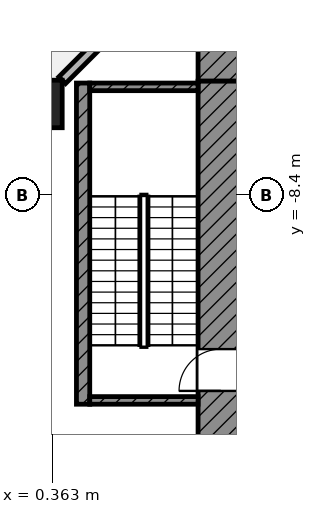
"""IFC4 building model, lengths in metres.
Left out: names, types, materials, properties, quantities, classifications, styles, units other than length and angle.
Written with IfcOpenShell. Run it as: python <this file> out.ifc"""

import sys

from ifc_helpers import new_model, si_unit, direction, frame, frame_2d, origin, origin_2d, place, context, subcontext, project, spatial, rectangle, extrude, element, fill, save


model = new_model("IFC4")
c1 = context("Model", 3, precision=1e-05, world=origin(), true_north=direction((0.0, 1.0)))
c2 = subcontext(c1, "Body", "Model", "MODEL_VIEW")
j1 = project(units=[si_unit("LENGTHUNIT", "METRE"), si_unit("PLANEANGLEUNIT", "RADIAN")], contexts=[c1])
p1 = place(None, origin())
s1 = spatial("IfcSite", under=j1, at=p1, CompositionType="ELEMENT")
p2 = place(p1, origin())
s2 = spatial("IfcBuilding", under=s1, at=p2, CompositionType="ELEMENT")
p3 = place(p2, frame((0.0, 0.0, 34.2)))
s3 = spatial("IfcBuildingStorey", under=s2, at=p3, CompositionType="ELEMENT", Elevation=34.2)
p4 = place(p3, frame((0.0, -6.0, 0.0), z_axis=(0.0, 0.0, 1.0), x_axis=(1.0, 0.0, 0.0)))
e1 = element("IfcColumn", 1, at=p4, inside=s3, PredefinedType="COLUMN", context=c2, shape_type="SweptSolid", body=[
    extrude(rectangle(XDim=1.25, YDim=1.25, at=origin_2d()), origin(), (0.0, 0.0, 1.0), 5.0),
])
p5 = place(p3, frame((5.375, -0.625, 0.0), z_axis=(0.0, 0.0, 1.0), x_axis=(-0.707106781187, -0.707106781187, 0.0)))
e2 = element("IfcWall", 2, at=p5, inside=s3, PredefinedType="SOLIDWALL", context=c2, shape_type="SweptSolid", body=[
    extrude(rectangle(XDim=6.718, YDim=0.25, at=frame_2d((3.359, 0.0))), origin(), (0.0, 0.0, 1.0), 3.08),
])
p6 = place(p3, frame((4.2, -4.8, 0.0), z_axis=(0.0, 0.0, 1.0), x_axis=(1.0, 0.0, 0.0)))
e3 = element("IfcWall", 3, at=p6, inside=s3, PredefinedType="SHEAR", context=c2, shape_type="SweptSolid", body=[
    extrude(rectangle(XDim=20.9, YDim=1.2, at=frame_2d((10.45, 0.0))), origin(), (0.0, 0.0, 1.0), 4.58),
])
p7 = place(p6, frame((1.95, 0.0, 0.0)))
e4 = element("IfcOpeningElement", 4, at=p7, cuts=e3, PredefinedType="OPENING", context=c2, shape_type="SweptSolid", body=[
    extrude(rectangle(XDim=1.1, YDim=2.1, at=frame_2d((0.55, 1.05))), frame((0.0, 0.61, 0.0), z_axis=(0.0, -1.0, 0.0), x_axis=(1.0, 0.0, 0.0)), (0.0, 0.0, 1.0), 1.22),
])
p8 = place(p6, frame((17.95, 0.0, 0.0)))
e5 = element("IfcOpeningElement", 5, at=p8, cuts=e3, PredefinedType="OPENING", context=c2, shape_type="SweptSolid", body=[
    extrude(rectangle(XDim=1.1, YDim=2.1, at=frame_2d((0.55, 1.05))), frame((0.0, 0.61, 0.0), z_axis=(0.0, -1.0, 0.0), x_axis=(1.0, 0.0, 0.0)), (0.0, 0.0, 1.0), 1.22),
])
p9 = place(p3, frame((4.8, -25.1, 0.0), z_axis=(0.0, 0.0, 1.0), x_axis=(0.0, 1.0, 0.0)))
e6 = element("IfcWall", 6, at=p9, inside=s3, PredefinedType="SHEAR", context=c2, shape_type="SweptSolid", body=[
    extrude(rectangle(XDim=19.7, YDim=1.2, at=frame_2d((9.85, 0.0))), origin(), (0.0, 0.0, 1.0), 4.58),
])
p10 = place(p9, frame((11.55, 0.0, 0.0)))
e7 = element("IfcOpeningElement", 7, at=p10, cuts=e6, PredefinedType="OPENING", context=c2, shape_type="SweptSolid", body=[
    extrude(rectangle(XDim=1.1, YDim=2.1, at=frame_2d((0.55, 1.05))), frame((0.0, 0.61, 0.0), z_axis=(0.0, -1.0, 0.0), x_axis=(1.0, 0.0, 0.0)), (0.0, 0.0, 1.0), 1.22),
])
p11 = place(p9, frame((2.25, 0.0, 0.0)))
e8 = element("IfcOpeningElement", 8, at=p11, cuts=e6, PredefinedType="OPENING", context=c2, shape_type="SweptSolid", body=[
    extrude(rectangle(XDim=1.1, YDim=2.1, at=frame_2d((0.55, 1.05))), frame((0.0, 0.61, 0.0), z_axis=(0.0, -1.0, 0.0), x_axis=(1.0, 0.0, 0.0)), (0.0, 0.0, 1.0), 1.22),
])
p12 = place(p3, frame((1.175, -13.9, 0.0), z_axis=(0.0, 0.0, 1.0), x_axis=(0.0, 1.0, 0.0)))
e9 = element("IfcWall", 9, at=p12, inside=s3, PredefinedType="SHEAR", context=c2, shape_type="SweptSolid", body=[
    extrude(rectangle(XDim=8.45, YDim=0.35, at=frame_2d((4.225, 0.0))), origin(), (0.0, 0.0, 1.0), 4.58),
])
for number, where, z_axis, x_axis in (
    (10, (1.35, -5.55, 0.0), (0.0, 0.0, 1.0), (1.0, 0.0, 0.0)),
    (11, (1.35, -13.8, 0.0), (0.0, 0.0, 1.0), (1.0, 0.0, 0.0)),
):
    element("IfcWall", number, at=place(p3, frame(where, z_axis=z_axis, x_axis=x_axis)), inside=s3, PredefinedType="SHEAR", context=c2, shape_type="SweptSolid", body=[
        extrude(rectangle(XDim=2.85, YDim=0.2, at=frame_2d((1.425, 0.0))), origin(), (0.0, 0.0, 1.0), 4.58),
    ])
p13 = place(p10, origin())
e12 = element("IfcDoor", 12, at=p13, inside=s3, OperationType="SINGLE_SWING_LEFT", PredefinedType="DOOR", context=c2, shape_type="SweptSolid", body=[
    extrude(rectangle(XDim=1.1, YDim=2.1, at=frame_2d((0.55, 1.05))), frame((0.0, 0.025, 0.0), z_axis=(0.0, -1.0, 0.0), x_axis=(1.0, 0.0, 0.0)), (0.0, 0.0, 1.0), 0.05),
])
fill(e7, e12)
save(model, sys.argv[1])
